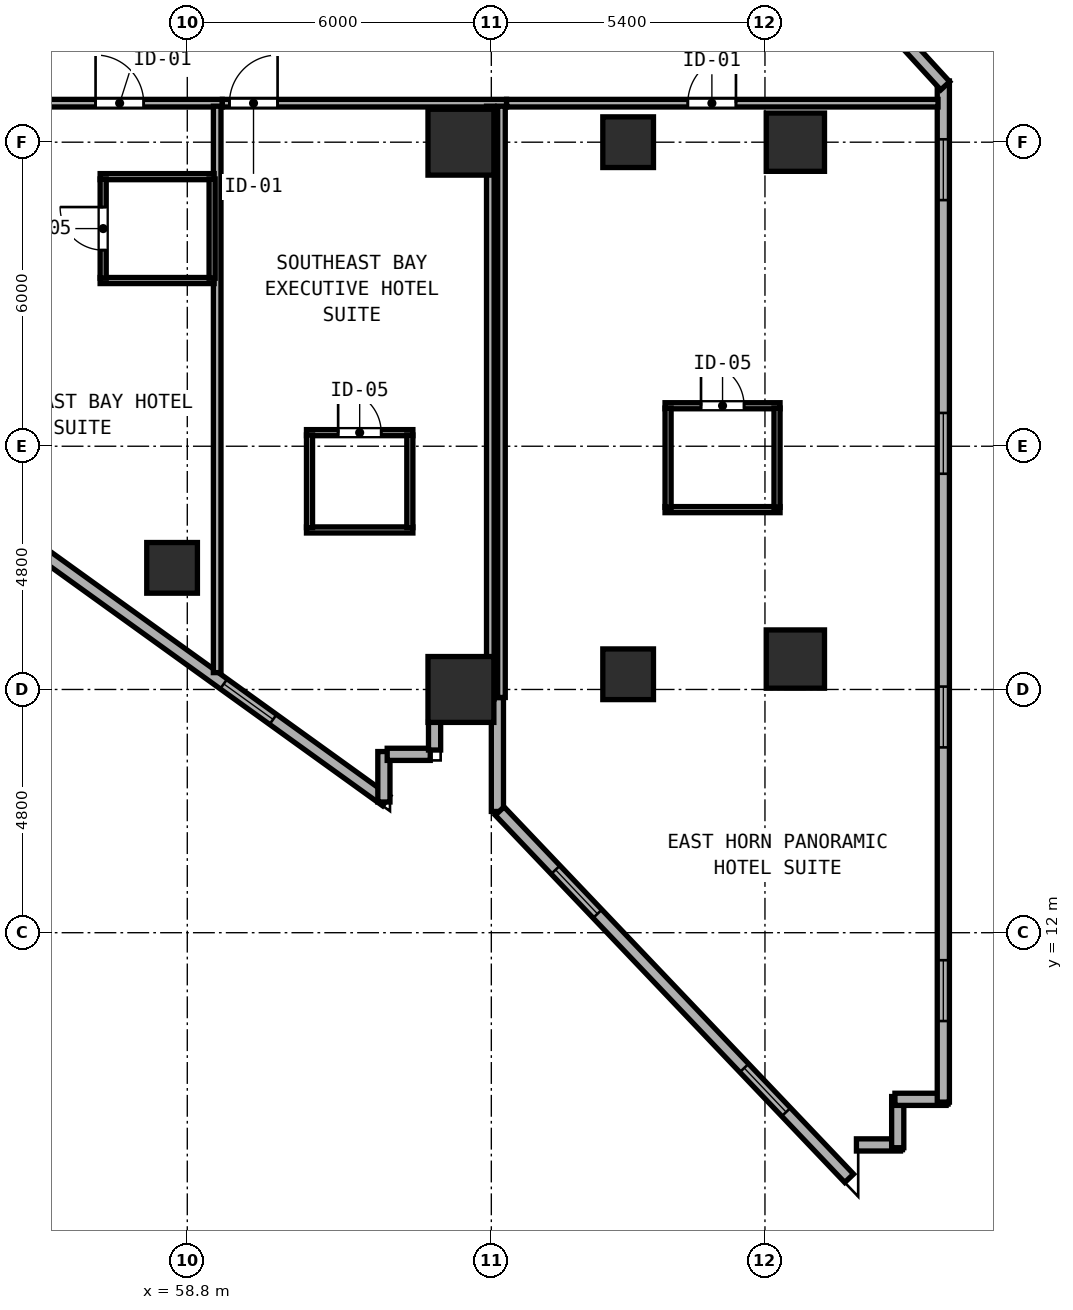
"""IFC4 building model, lengths in metres.
Left out: names, types, materials, properties, quantities, classifications, styles, units other than length and angle.
Written with IfcOpenShell. Run it as: python <this file> out.ifc"""

import sys

from ifc_helpers import new_model, si_unit, direction, frame, frame_2d, origin, origin_2d, place, context, subcontext, project, spatial, rectangle, hollow_rectangle, extrude, element, fill, save


model = new_model("IFC4")
c1 = context("Model", 3, precision=1e-05, world=origin(), true_north=direction((0.0, 1.0)))
c2 = subcontext(c1, "Body", "Model", "MODEL_VIEW")
j1 = project(units=[si_unit("LENGTHUNIT", "METRE"), si_unit("PLANEANGLEUNIT", "RADIAN")], contexts=[c1])
p1 = place(None, origin())
s1 = spatial("IfcSite", under=j1, at=p1, CompositionType="ELEMENT")
p2 = place(p1, origin())
s2 = spatial("IfcBuilding", under=s1, at=p2, CompositionType="ELEMENT")
p3 = place(p2, frame((0.0, 0.0, 31.6)))
s3 = spatial("IfcBuildingStorey", under=s2, at=p3, CompositionType="ELEMENT", Elevation=31.6)
for number, where, z_axis, x_axis in (
    (1, (64.2, 16.8, 0.0), (0.0, 0.0, 1.0), (1.0, 0.0, 0.0)),
    (2, (64.2, 27.6, 0.0), (0.0, 0.0, 1.0), (1.0, 0.0, 0.0)),
):
    element("IfcColumn", number, at=place(p3, frame(where, z_axis=z_axis, x_axis=x_axis)), inside=s3, PredefinedType="COLUMN", context=c2, shape_type="SweptSolid", body=[
        extrude(hollow_rectangle(XDim=1.3, YDim=1.3, WallThickness=0.048, at=origin_2d()), origin(), (0.0, 0.0, 1.0), 3.8),
    ])
for number, where, z_axis, x_axis in (
    (3, (70.8, 17.4, 0.0), (0.0, 0.0, 1.0), (1.0, 0.0, 0.0)),
    (4, (70.8, 27.6, 0.0), (0.0, 0.0, 1.0), (1.0, 0.0, 0.0)),
):
    element("IfcColumn", number, at=place(p3, frame(where, z_axis=z_axis, x_axis=x_axis)), inside=s3, PredefinedType="COLUMN", context=c2, shape_type="SweptSolid", body=[
        extrude(hollow_rectangle(XDim=1.15, YDim=1.15, WallThickness=0.042, at=origin_2d()), origin(), (0.0, 0.0, 1.0), 3.8),
    ])
for number, where, z_axis, x_axis in (
    (5, (58.5, 19.2, 0.0), (0.0, 0.0, 1.0), (1.0, 0.0, 0.0)),
    (6, (67.5, 17.1, 0.0), (0.0, 0.0, 1.0), (1.0, 0.0, 0.0)),
    (7, (67.5, 27.6, 0.0), (0.0, 0.0, 1.0), (1.0, 0.0, 0.0)),
):
    element("IfcColumn", number, at=place(p3, frame(where, z_axis=z_axis, x_axis=x_axis)), inside=s3, PredefinedType="COLUMN", context=c2, shape_type="SweptSolid", body=[
        extrude(hollow_rectangle(XDim=1.0, YDim=1.0, WallThickness=0.038, at=origin_2d()), origin(), (0.0, 0.0, 1.0), 3.8),
    ])
p4 = place(p3, frame((53.442, 21.286, 0.0), z_axis=(0.0, 0.0, 1.0), x_axis=(0.811542842993, -0.584292917967, 0.0)))
e8 = element("IfcWall", 8, at=p4, inside=s3, PredefinedType="SOLIDWALL", context=c2, shape_type="SweptSolid", body=[
    extrude(rectangle(XDim=11.438, YDim=0.24, at=frame_2d((5.719, 0.0))), origin(), (0.0, 0.0, 1.0), 3.097),
])
p5 = place(p4, frame((1.6, 0.0, 0.85)))
e9 = element("IfcOpeningElement", 9, at=p5, cuts=e8, PredefinedType="OPENING", context=c2, shape_type="SweptSolid", body=[
    extrude(rectangle(XDim=1.2, YDim=1.85, at=frame_2d((0.6, 0.925))), frame((0.0, 0.13, 0.0), z_axis=(0.0, -1.0, 0.0), x_axis=(1.0, 0.0, 0.0)), (0.0, 0.0, 1.0), 0.26),
])
p6 = place(p4, frame((7.489, 0.0, 0.85)))
e10 = element("IfcOpeningElement", 10, at=p6, cuts=e8, PredefinedType="OPENING", context=c2, shape_type="SweptSolid", body=[
    extrude(rectangle(XDim=1.2, YDim=1.85, at=frame_2d((0.6, 0.925))), frame((0.0, 0.13, 0.0), z_axis=(0.0, -1.0, 0.0), x_axis=(1.0, 0.0, 0.0)), (0.0, 0.0, 1.0), 0.26),
])
p7 = place(p3, frame((62.68, 14.579, 0.0), z_axis=(0.0, 0.0, 1.0), x_axis=(0.0, 1.0, 0.0)))
e11 = element("IfcWall", 11, at=p7, inside=s3, PredefinedType="SOLIDWALL", context=c2, shape_type="SweptSolid", body=[
    extrude(rectangle(XDim=0.996, YDim=0.24, at=frame_2d((0.498, 0.0))), origin(), (0.0, 0.0, 1.0), 3.6),
])
p8 = place(p3, frame((62.745, 15.52, 0.0), z_axis=(0.0, 0.0, 1.0), x_axis=(1.0, 0.0, 0.0)))
e12 = element("IfcWall", 12, at=p8, inside=s3, PredefinedType="SOLIDWALL", context=c2, shape_type="SweptSolid", body=[
    extrude(rectangle(XDim=0.85, YDim=0.24, at=frame_2d((0.425, 0.0))), origin(), (0.0, 0.0, 1.0), 3.6),
])
p9 = place(p3, frame((63.68, 15.605, 0.0), z_axis=(0.0, 0.0, 1.0), x_axis=(0.0, 1.0, 0.0)))
e13 = element("IfcWall", 13, at=p9, inside=s3, PredefinedType="SOLIDWALL", context=c2, shape_type="SweptSolid", body=[
    extrude(rectangle(XDim=0.553, YDim=0.24, at=frame_2d((0.276, 0.0))), origin(), (0.0, 0.0, 1.0), 3.6),
])
p10 = place(p3, frame((64.92, 16.64, 0.0), z_axis=(0.0, 0.0, 1.0), x_axis=(0.0, -1.0, 0.0)))
e14 = element("IfcWall", 14, at=p10, inside=s3, PredefinedType="SOLIDWALL", context=c2, shape_type="SweptSolid", body=[
    extrude(rectangle(XDim=2.247, YDim=0.24, at=frame_2d((1.124, 0.0))), origin(), (0.0, 0.0, 1.0), 3.6),
])
p11 = place(p3, frame((64.965, 14.401, 0.0), z_axis=(0.0, 0.0, 1.0), x_axis=(0.689367491845, -0.724411803594, 0.0)))
e15 = element("IfcWall", 15, at=p11, inside=s3, PredefinedType="SOLIDWALL", context=c2, shape_type="SweptSolid", body=[
    extrude(rectangle(XDim=10.004, YDim=0.24, at=frame_2d((5.002, 0.0))), origin(), (0.0, 0.0, 1.0), 3.6),
])
p12 = place(p11, frame((1.6, 0.0, 0.85)))
e16 = element("IfcOpeningElement", 16, at=p12, cuts=e15, PredefinedType="OPENING", context=c2, shape_type="SweptSolid", body=[
    extrude(rectangle(XDim=1.2, YDim=1.85, at=frame_2d((0.6, 0.925))), frame((0.0, 0.13, 0.0), z_axis=(0.0, -1.0, 0.0), x_axis=(1.0, 0.0, 0.0)), (0.0, 0.0, 1.0), 0.26),
])
p13 = place(p11, frame((7.0, 0.0, 0.85)))
e17 = element("IfcOpeningElement", 17, at=p13, cuts=e15, PredefinedType="OPENING", context=c2, shape_type="SweptSolid", body=[
    extrude(rectangle(XDim=1.2, YDim=1.85, at=frame_2d((0.6, 0.925))), frame((0.0, 0.13, 0.0), z_axis=(0.0, -1.0, 0.0), x_axis=(1.0, 0.0, 0.0)), (0.0, 0.0, 1.0), 0.26),
])
p14 = place(p3, frame((72.005, 7.812, 0.0), z_axis=(0.0, 0.0, 1.0), x_axis=(1.0, 0.0, 0.0)))
e18 = element("IfcWall", 18, at=p14, inside=s3, PredefinedType="SOLIDWALL", context=c2, shape_type="SweptSolid", body=[
    extrude(rectangle(XDim=0.87, YDim=0.24, at=frame_2d((0.435, 0.0))), origin(), (0.0, 0.0, 1.0), 3.6),
])
for number, where, z_axis, x_axis in (
    (19, (72.82, 7.757, 0.0), (0.0, 0.0, 1.0), (0.0, 1.0, 0.0)),
    (20, (72.765, 8.712, 0.0), (0.0, 0.0, 1.0), (1.0, 0.0, 0.0)),
):
    element("IfcWall", number, at=place(p3, frame(where, z_axis=z_axis, x_axis=x_axis)), inside=s3, PredefinedType="SOLIDWALL", context=c2, shape_type="SweptSolid", body=[
        extrude(rectangle(XDim=1.01, YDim=0.24, at=frame_2d((0.505, 0.0))), origin(), (0.0, 0.0, 1.0), 3.6),
    ])
p15 = place(p3, frame((73.72, 8.657, 0.0), z_axis=(0.0, 0.0, 1.0), x_axis=(0.0, 1.0, 0.0)))
e21 = element("IfcWall", 21, at=p15, inside=s3, PredefinedType="SOLIDWALL", context=c2, shape_type="SweptSolid", body=[
    extrude(rectangle(XDim=20.151, YDim=0.24, at=frame_2d((10.076, 0.0))), origin(), (0.0, 0.0, 1.0), 3.6),
])
p16 = place(p15, frame((1.6, 0.0, 0.85)))
e22 = element("IfcOpeningElement", 22, at=p16, cuts=e21, PredefinedType="OPENING", context=c2, shape_type="SweptSolid", body=[
    extrude(rectangle(XDim=1.2, YDim=1.85, at=frame_2d((0.6, 0.925))), frame((0.0, 0.13, 0.0), z_axis=(0.0, -1.0, 0.0), x_axis=(1.0, 0.0, 0.0)), (0.0, 0.0, 1.0), 0.26),
])
p17 = place(p15, frame((7.0, 0.0, 0.85)))
e23 = element("IfcOpeningElement", 23, at=p17, cuts=e21, PredefinedType="OPENING", context=c2, shape_type="SweptSolid", body=[
    extrude(rectangle(XDim=1.2, YDim=1.85, at=frame_2d((0.6, 0.925))), frame((0.0, 0.13, 0.0), z_axis=(0.0, -1.0, 0.0), x_axis=(1.0, 0.0, 0.0)), (0.0, 0.0, 1.0), 0.26),
])
p18 = place(p15, frame((12.4, 0.0, 0.85)))
e24 = element("IfcOpeningElement", 24, at=p18, cuts=e21, PredefinedType="OPENING", context=c2, shape_type="SweptSolid", body=[
    extrude(rectangle(XDim=1.2, YDim=1.85, at=frame_2d((0.6, 0.925))), frame((0.0, 0.13, 0.0), z_axis=(0.0, -1.0, 0.0), x_axis=(1.0, 0.0, 0.0)), (0.0, 0.0, 1.0), 0.26),
])
p19 = place(p15, frame((17.8, 0.0, 0.85)))
e25 = element("IfcOpeningElement", 25, at=p19, cuts=e21, PredefinedType="OPENING", context=c2, shape_type="SweptSolid", body=[
    extrude(rectangle(XDim=1.2, YDim=1.85, at=frame_2d((0.6, 0.925))), frame((0.0, 0.13, 0.0), z_axis=(0.0, -1.0, 0.0), x_axis=(1.0, 0.0, 0.0)), (0.0, 0.0, 1.0), 0.26),
])
p20 = place(p3, frame((73.757, 28.713, 0.0), z_axis=(0.0, 0.0, 1.0), x_axis=(-0.675744797284, 0.737135651657, 0.0)))
e26 = element("IfcWall", 26, at=p20, inside=s3, PredefinedType="SOLIDWALL", context=c2, shape_type="SweptSolid", body=[
    extrude(rectangle(XDim=3.289, YDim=0.24, at=frame_2d((1.645, 0.0))), origin(), (0.0, 0.0, 1.0), 3.6),
])
p21 = place(p3, frame((52.7, 28.37, 0.0), z_axis=(0.0, 0.0, 1.0), x_axis=(1.0, 0.0, 0.0)))
e27 = element("IfcWall", 27, at=p21, inside=s3, PredefinedType="PARTITIONING", context=c2, shape_type="SweptSolid", body=[
    extrude(rectangle(XDim=6.79, YDim=0.15, at=frame_2d((3.395, 0.0))), origin(), (0.0, 0.0, 1.0), 3.6),
])
p22 = place(p21, frame((5.24, 0.0, 0.0), z_axis=(0.0, 0.0, 1.0), x_axis=(-1.0, 0.0, 0.0)))
e28 = element("IfcOpeningElement", 28, at=p22, cuts=e27, PredefinedType="OPENING", context=c2, shape_type="SweptSolid", body=[
    extrude(rectangle(XDim=0.95, YDim=2.18, at=frame_2d((0.475, 1.09))), frame((0.0, 0.085, 0.0), z_axis=(0.0, -1.0, 0.0), x_axis=(1.0, 0.0, 0.0)), (0.0, 0.0, 1.0), 0.17),
])
p23 = place(p3, frame((59.39, 17.133, 0.0), z_axis=(0.0, 0.0, 1.0), x_axis=(0.0, 1.0, 0.0)))
e29 = element("IfcWall", 29, at=p23, inside=s3, PredefinedType="PARTITIONING", context=c2, shape_type="SweptSolid", body=[
    extrude(rectangle(XDim=11.177, YDim=0.15, at=frame_2d((5.589, 0.0))), origin(), (0.0, 0.0, 1.0), 3.6),
])
p24 = place(p3, frame((57.08, 26.92, 0.0), z_axis=(0.0, 0.0, 1.0), x_axis=(1.0, 0.0, 0.0)))
e30 = element("IfcWall", 30, at=p24, inside=s3, PredefinedType="PARTITIONING", context=c2, shape_type="SweptSolid", body=[
    extrude(rectangle(XDim=2.25, YDim=0.12, at=frame_2d((1.125, 0.0))), origin(), (0.0, 0.0, 1.0), 3.6),
])
p25 = place(p3, frame((57.08, 24.87, 0.0), z_axis=(0.0, 0.0, 1.0), x_axis=(1.0, 0.0, 0.0)))
e31 = element("IfcWall", 31, at=p25, inside=s3, PredefinedType="PARTITIONING", context=c2, shape_type="SweptSolid", body=[
    extrude(rectangle(XDim=2.25, YDim=0.12, at=frame_2d((1.125, 0.0))), origin(), (0.0, 0.0, 1.0), 3.185),
])
p26 = place(p3, frame((57.14, 24.915, 0.0), z_axis=(0.0, 0.0, 1.0), x_axis=(0.0, 1.0, 0.0)))
e32 = element("IfcWall", 32, at=p26, inside=s3, PredefinedType="PARTITIONING", context=c2, shape_type="SweptSolid", body=[
    extrude(rectangle(XDim=1.96, YDim=0.12, at=frame_2d((0.98, 0.0))), origin(), (0.0, 0.0, 1.0), 3.6),
])
p27 = place(p26, frame((1.405, 0.0, 0.0), z_axis=(0.0, 0.0, 1.0), x_axis=(-1.0, 0.0, 0.0)))
e33 = element("IfcOpeningElement", 33, at=p27, cuts=e32, PredefinedType="OPENING", context=c2, shape_type="SweptSolid", body=[
    extrude(rectangle(XDim=0.85, YDim=2.1, at=frame_2d((0.425, 1.05))), frame((0.0, 0.07, 0.0), z_axis=(0.0, -1.0, 0.0), x_axis=(1.0, 0.0, 0.0)), (0.0, 0.0, 1.0), 0.14),
])
p28 = place(p3, frame((59.29, 24.915, 0.0), z_axis=(0.0, 0.0, 1.0), x_axis=(0.0, 1.0, 0.0)))
e34 = element("IfcWall", 34, at=p28, inside=s3, PredefinedType="PARTITIONING", context=c2, shape_type="SweptSolid", body=[
    extrude(rectangle(XDim=1.96, YDim=0.12, at=frame_2d((0.98, 0.0))), origin(), (0.0, 0.0, 1.0), 3.6),
])
p29 = place(p3, frame((59.492, 28.37, 0.0), z_axis=(0.0, 0.0, 1.0), x_axis=(1.0, 0.0, 0.0)))
e35 = element("IfcWall", 35, at=p29, inside=s3, PredefinedType="PARTITIONING", context=c2, shape_type="SweptSolid", body=[
    extrude(rectangle(XDim=5.608, YDim=0.15, at=frame_2d((2.804, 0.0))), origin(), (0.0, 0.0, 1.0), 3.6),
])
p30 = place(p29, frame((1.09, 0.0, 0.0), z_axis=(0.0, 0.0, 1.0), x_axis=(-1.0, 0.0, 0.0)))
e36 = element("IfcOpeningElement", 36, at=p30, cuts=e35, PredefinedType="OPENING", context=c2, shape_type="SweptSolid", body=[
    extrude(rectangle(XDim=0.95, YDim=2.18, at=frame_2d((0.475, 1.09))), frame((0.0, 0.085, 0.0), z_axis=(0.0, -1.0, 0.0), x_axis=(1.0, 0.0, 0.0)), (0.0, 0.0, 1.0), 0.17),
])
p31 = place(p3, frame((65.0, 16.642, 0.0), z_axis=(0.0, 0.0, 1.0), x_axis=(0.0, 1.0, 0.0)))
e37 = element("IfcWall", 37, at=p31, inside=s3, PredefinedType="PARTITIONING", context=c2, shape_type="SweptSolid", body=[
    extrude(rectangle(XDim=11.668, YDim=0.15, at=frame_2d((5.834, 0.0))), origin(), (0.0, 0.0, 1.0), 3.6),
])
p32 = place(p3, frame((61.152, 21.868, 0.0), z_axis=(0.0, 0.0, 1.0), x_axis=(1.0, 0.0, 0.0)))
e38 = element("IfcWall", 38, at=p32, inside=s3, PredefinedType="PARTITIONING", context=c2, shape_type="SweptSolid", body=[
    extrude(rectangle(XDim=2.1, YDim=0.12, at=frame_2d((1.05, 0.0))), origin(), (0.0, 0.0, 1.0), 3.6),
])
p33 = place(p32, frame((1.475, 0.0, 0.0), z_axis=(0.0, 0.0, 1.0), x_axis=(-1.0, 0.0, 0.0)))
e39 = element("IfcOpeningElement", 39, at=p33, cuts=e38, PredefinedType="OPENING", context=c2, shape_type="SweptSolid", body=[
    extrude(rectangle(XDim=0.85, YDim=2.1, at=frame_2d((0.425, 1.05))), frame((0.0, 0.07, 0.0), z_axis=(0.0, -1.0, 0.0), x_axis=(1.0, 0.0, 0.0)), (0.0, 0.0, 1.0), 0.14),
])
p34 = place(p3, frame((61.152, 19.948, 0.0), z_axis=(0.0, 0.0, 1.0), x_axis=(1.0, 0.0, 0.0)))
e40 = element("IfcWall", 40, at=p34, inside=s3, PredefinedType="PARTITIONING", context=c2, shape_type="SweptSolid", body=[
    extrude(rectangle(XDim=2.1, YDim=0.12, at=frame_2d((1.05, 0.0))), origin(), (0.0, 0.0, 1.0), 3.6),
])
for number, where, z_axis, x_axis in (
    (41, (61.212, 19.993, 0.0), (0.0, 0.0, 1.0), (0.0, 1.0, 0.0)),
    (42, (63.192, 19.993, 0.0), (0.0, 0.0, 1.0), (0.0, 1.0, 0.0)),
):
    element("IfcWall", number, at=place(p3, frame(where, z_axis=z_axis, x_axis=x_axis)), inside=s3, PredefinedType="PARTITIONING", context=c2, shape_type="SweptSolid", body=[
        extrude(rectangle(XDim=1.83, YDim=0.12, at=frame_2d((0.915, 0.0))), origin(), (0.0, 0.0, 1.0), 3.6),
    ])
p35 = place(p3, frame((65.102, 28.37, 0.0), z_axis=(0.0, 0.0, 1.0), x_axis=(1.0, 0.0, 0.0)))
e43 = element("IfcWall", 43, at=p35, inside=s3, PredefinedType="PARTITIONING", context=c2, shape_type="SweptSolid", body=[
    extrude(rectangle(XDim=8.513, YDim=0.15, at=frame_2d((4.256, 0.0))), origin(), (0.0, 0.0, 1.0), 3.6),
])
p36 = place(p35, frame((4.526, 0.0, 0.0), z_axis=(0.0, 0.0, 1.0), x_axis=(-1.0, 0.0, 0.0)))
e44 = element("IfcOpeningElement", 44, at=p36, cuts=e43, PredefinedType="OPENING", context=c2, shape_type="SweptSolid", body=[
    extrude(rectangle(XDim=0.95, YDim=2.18, at=frame_2d((0.475, 1.09))), frame((0.0, 0.085, 0.0), z_axis=(0.0, -1.0, 0.0), x_axis=(1.0, 0.0, 0.0)), (0.0, 0.0, 1.0), 0.17),
])
p37 = place(p3, frame((64.78, 16.612, 0.0), z_axis=(0.0, 0.0, 1.0), x_axis=(0.0, 1.0, 0.0)))
e45 = element("IfcWall", 45, at=p37, inside=s3, PredefinedType="PARTITIONING", context=c2, shape_type="SweptSolid", body=[
    extrude(rectangle(XDim=11.698, YDim=0.15, at=frame_2d((5.849, 0.0))), origin(), (0.0, 0.0, 1.0), 3.6),
])
p38 = place(p3, frame((68.228, 22.399, 0.0), z_axis=(0.0, 0.0, 1.0), x_axis=(1.0, 0.0, 0.0)))
e46 = element("IfcWall", 46, at=p38, inside=s3, PredefinedType="PARTITIONING", context=c2, shape_type="SweptSolid", body=[
    extrude(rectangle(XDim=2.27, YDim=0.12, at=frame_2d((1.135, 0.0))), origin(), (0.0, 0.0, 1.0), 3.6),
])
p39 = place(p38, frame((1.56, 0.0, 0.0), z_axis=(0.0, 0.0, 1.0), x_axis=(-1.0, 0.0, 0.0)))
e47 = element("IfcOpeningElement", 47, at=p39, cuts=e46, PredefinedType="OPENING", context=c2, shape_type="SweptSolid", body=[
    extrude(rectangle(XDim=0.85, YDim=2.1, at=frame_2d((0.425, 1.05))), frame((0.0, 0.07, 0.0), z_axis=(0.0, -1.0, 0.0), x_axis=(1.0, 0.0, 0.0)), (0.0, 0.0, 1.0), 0.14),
])
p40 = place(p3, frame((68.228, 20.349, 0.0), z_axis=(0.0, 0.0, 1.0), x_axis=(1.0, 0.0, 0.0)))
e48 = element("IfcWall", 48, at=p40, inside=s3, PredefinedType="PARTITIONING", context=c2, shape_type="SweptSolid", body=[
    extrude(rectangle(XDim=2.27, YDim=0.12, at=frame_2d((1.135, 0.0))), origin(), (0.0, 0.0, 1.0), 3.6),
])
for number, where, z_axis, x_axis in (
    (49, (68.288, 20.394, 0.0), (0.0, 0.0, 1.0), (0.0, 1.0, 0.0)),
    (50, (70.438, 20.394, 0.0), (0.0, 0.0, 1.0), (0.0, 1.0, 0.0)),
):
    element("IfcWall", number, at=place(p3, frame(where, z_axis=z_axis, x_axis=x_axis)), inside=s3, PredefinedType="PARTITIONING", context=c2, shape_type="SweptSolid", body=[
        extrude(rectangle(XDim=1.96, YDim=0.12, at=frame_2d((0.98, 0.0))), origin(), (0.0, 0.0, 1.0), 3.6),
    ])
p41 = place(p6, origin())
e51 = element("IfcWindow", 51, at=p41, inside=s3, PartitioningType="SINGLE_PANEL", PredefinedType="WINDOW", context=c2, shape_type="SweptSolid", body=[
    extrude(rectangle(XDim=1.2, YDim=1.85, at=frame_2d((0.6, 0.925))), frame((0.0, 0.03, 0.0), z_axis=(0.0, -1.0, 0.0), x_axis=(1.0, 0.0, 0.0)), (0.0, 0.0, 1.0), 0.06),
])
fill(e10, e51)
p42 = place(p12, origin())
e52 = element("IfcWindow", 52, at=p42, inside=s3, PartitioningType="SINGLE_PANEL", PredefinedType="WINDOW", context=c2, shape_type="SweptSolid", body=[
    extrude(rectangle(XDim=1.2, YDim=1.85, at=frame_2d((0.6, 0.925))), frame((0.0, 0.03, 0.0), z_axis=(0.0, -1.0, 0.0), x_axis=(1.0, 0.0, 0.0)), (0.0, 0.0, 1.0), 0.06),
])
fill(e16, e52)
p43 = place(p13, origin())
e53 = element("IfcWindow", 53, at=p43, inside=s3, PartitioningType="SINGLE_PANEL", PredefinedType="WINDOW", context=c2, shape_type="SweptSolid", body=[
    extrude(rectangle(XDim=1.2, YDim=1.85, at=frame_2d((0.6, 0.925))), frame((0.0, 0.03, 0.0), z_axis=(0.0, -1.0, 0.0), x_axis=(1.0, 0.0, 0.0)), (0.0, 0.0, 1.0), 0.06),
])
fill(e17, e53)
p44 = place(p16, origin())
e54 = element("IfcWindow", 54, at=p44, inside=s3, PartitioningType="SINGLE_PANEL", PredefinedType="WINDOW", context=c2, shape_type="SweptSolid", body=[
    extrude(rectangle(XDim=1.2, YDim=1.85, at=frame_2d((0.6, 0.925))), frame((0.0, 0.03, 0.0), z_axis=(0.0, -1.0, 0.0), x_axis=(1.0, 0.0, 0.0)), (0.0, 0.0, 1.0), 0.06),
])
fill(e22, e54)
p45 = place(p17, origin())
e55 = element("IfcWindow", 55, at=p45, inside=s3, PartitioningType="SINGLE_PANEL", PredefinedType="WINDOW", context=c2, shape_type="SweptSolid", body=[
    extrude(rectangle(XDim=1.2, YDim=1.85, at=frame_2d((0.6, 0.925))), frame((0.0, 0.03, 0.0), z_axis=(0.0, -1.0, 0.0), x_axis=(1.0, 0.0, 0.0)), (0.0, 0.0, 1.0), 0.06),
])
fill(e23, e55)
p46 = place(p18, origin())
e56 = element("IfcWindow", 56, at=p46, inside=s3, PartitioningType="SINGLE_PANEL", PredefinedType="WINDOW", context=c2, shape_type="SweptSolid", body=[
    extrude(rectangle(XDim=1.2, YDim=1.85, at=frame_2d((0.6, 0.925))), frame((0.0, 0.03, 0.0), z_axis=(0.0, -1.0, 0.0), x_axis=(1.0, 0.0, 0.0)), (0.0, 0.0, 1.0), 0.06),
])
fill(e24, e56)
p47 = place(p19, origin())
e57 = element("IfcWindow", 57, at=p47, inside=s3, PartitioningType="SINGLE_PANEL", PredefinedType="WINDOW", context=c2, shape_type="SweptSolid", body=[
    extrude(rectangle(XDim=1.2, YDim=1.85, at=frame_2d((0.6, 0.925))), frame((0.0, 0.03, 0.0), z_axis=(0.0, -1.0, 0.0), x_axis=(1.0, 0.0, 0.0)), (0.0, 0.0, 1.0), 0.06),
])
fill(e25, e57)
p48 = place(p22, origin())
e58 = element("IfcDoor", 58, at=p48, inside=s3, OperationType="SINGLE_SWING_RIGHT", PredefinedType="DOOR", context=c2, shape_type="SweptSolid", body=[
    extrude(rectangle(XDim=0.95, YDim=2.18, at=frame_2d((0.475, 1.09))), frame((0.0, 0.025, 0.0), z_axis=(0.0, -1.0, 0.0), x_axis=(1.0, 0.0, 0.0)), (0.0, 0.0, 1.0), 0.05),
])
fill(e28, e58)
p49 = place(p27, origin())
e59 = element("IfcDoor", 59, at=p49, inside=s3, OperationType="SINGLE_SWING_LEFT", PredefinedType="DOOR", context=c2, shape_type="SweptSolid", body=[
    extrude(rectangle(XDim=0.85, YDim=2.1, at=frame_2d((0.425, 1.05))), frame((0.0, 0.025, 0.0), z_axis=(0.0, -1.0, 0.0), x_axis=(1.0, 0.0, 0.0)), (0.0, 0.0, 1.0), 0.05),
])
fill(e33, e59)
p50 = place(p30, origin())
e60 = element("IfcDoor", 60, at=p50, inside=s3, OperationType="SINGLE_SWING_LEFT", PredefinedType="DOOR", context=c2, shape_type="SweptSolid", body=[
    extrude(rectangle(XDim=0.95, YDim=2.18, at=frame_2d((0.475, 1.09))), frame((0.0, 0.025, 0.0), z_axis=(0.0, -1.0, 0.0), x_axis=(1.0, 0.0, 0.0)), (0.0, 0.0, 1.0), 0.05),
])
fill(e36, e60)
p51 = place(p33, origin())
e61 = element("IfcDoor", 61, at=p51, inside=s3, OperationType="SINGLE_SWING_RIGHT", PredefinedType="DOOR", context=c2, shape_type="SweptSolid", body=[
    extrude(rectangle(XDim=0.85, YDim=2.1, at=frame_2d((0.425, 1.05))), frame((0.0, 0.025, 0.0), z_axis=(0.0, -1.0, 0.0), x_axis=(1.0, 0.0, 0.0)), (0.0, 0.0, 1.0), 0.05),
])
fill(e39, e61)
p52 = place(p36, origin())
e62 = element("IfcDoor", 62, at=p52, inside=s3, OperationType="SINGLE_SWING_LEFT", PredefinedType="DOOR", context=c2, shape_type="SweptSolid", body=[
    extrude(rectangle(XDim=0.95, YDim=2.18, at=frame_2d((0.475, 1.09))), frame((0.0, 0.025, 0.0), z_axis=(0.0, -1.0, 0.0), x_axis=(1.0, 0.0, 0.0)), (0.0, 0.0, 1.0), 0.05),
])
fill(e44, e62)
p53 = place(p39, origin())
e63 = element("IfcDoor", 63, at=p53, inside=s3, OperationType="SINGLE_SWING_RIGHT", PredefinedType="DOOR", context=c2, shape_type="SweptSolid", body=[
    extrude(rectangle(XDim=0.85, YDim=2.1, at=frame_2d((0.425, 1.05))), frame((0.0, 0.025, 0.0), z_axis=(0.0, -1.0, 0.0), x_axis=(1.0, 0.0, 0.0)), (0.0, 0.0, 1.0), 0.05),
])
fill(e47, e63)
save(model, sys.argv[1])
